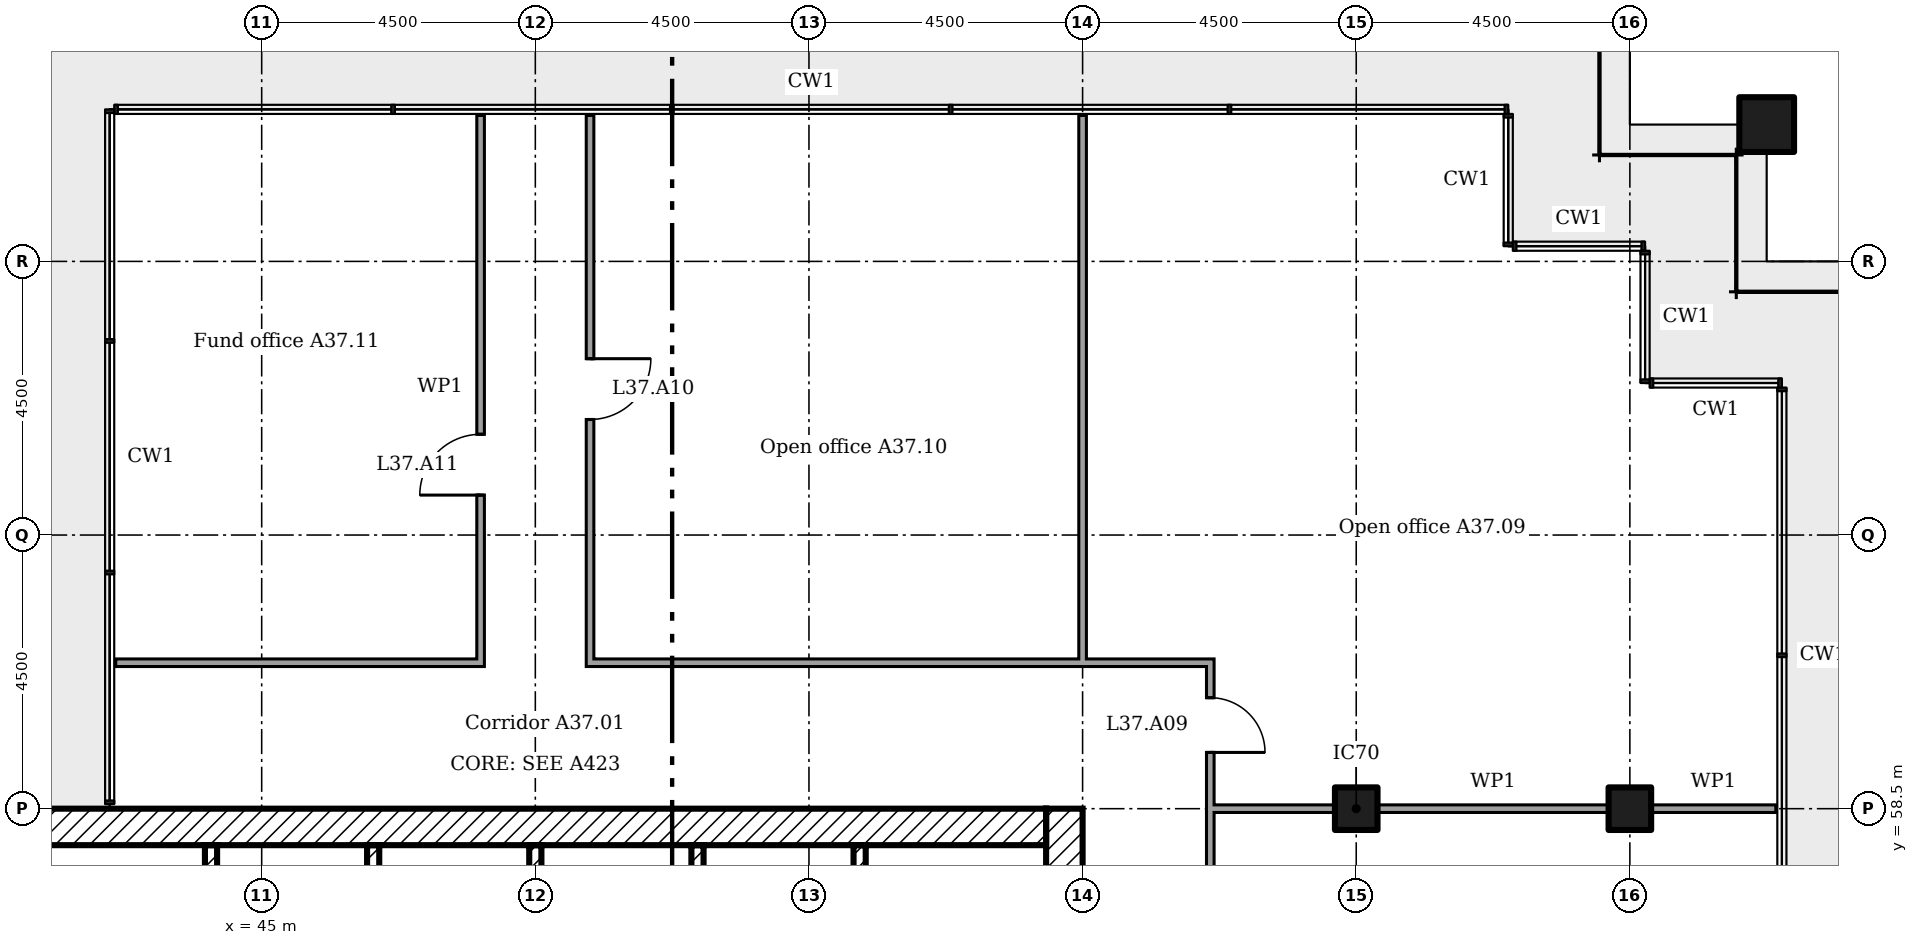
"""IFC4 building model, lengths in metres.
Left out: names, types, materials, properties, quantities, classifications, styles, units other than length and angle.
Written with IfcOpenShell. Run it as: python <this file> out.ifc"""

import sys

from ifc_helpers import new_model, si_unit, direction, frame, frame_2d, origin, origin_2d, place, context, subcontext, project, spatial, rectangle, extrude, element, fill, save


model = new_model("IFC4")
c1 = context("Model", 3, precision=1e-05, world=origin(), true_north=direction((0.0, 1.0)))
c2 = subcontext(c1, "Body", "Model", "MODEL_VIEW")
j1 = project(units=[si_unit("LENGTHUNIT", "METRE"), si_unit("PLANEANGLEUNIT", "RADIAN")], contexts=[c1])
p1 = place(None, origin())
s1 = spatial("IfcSite", under=j1, at=p1, CompositionType="ELEMENT")
p2 = place(p1, origin())
s2 = spatial("IfcBuilding", under=s1, at=p2, CompositionType="ELEMENT")
p3 = place(p2, frame((0.0, 0.0, 151.0)))
s3 = spatial("IfcBuildingStorey", under=s2, at=p3, CompositionType="ELEMENT", Elevation=151.0)
p4 = place(p3, frame((69.75, 69.75, 0.0)))
e1 = element("IfcColumn", 1, at=p4, inside=s3, PredefinedType="COLUMN", context=c2, shape_type="SweptSolid", body=[
    extrude(rectangle(XDim=0.9, YDim=0.9, at=origin_2d()), origin(), (0.0, 0.0, 1.0), 3.6),
])
for number, where in (
    (2, (63.0, 58.5, 0.0)),
    (3, (67.5, 58.5, 0.0)),
):
    element("IfcColumn", number, at=place(p3, frame(where)), inside=s3, PredefinedType="COLUMN", context=c2, shape_type="SweptSolid", body=[
        extrude(rectangle(XDim=0.7, YDim=0.7, at=origin_2d()), origin(), (0.0, 0.0, 1.0), 3.6),
    ])
p5 = place(p3, frame((58.2, 40.5, 0.0), z_axis=(0.0, 0.0, 1.0), x_axis=(0.0, 1.0, 0.0)))
e4 = element("IfcWall", 4, at=p5, inside=s3, PredefinedType="SHEAR", context=c2, shape_type="SweptSolid", body=[
    extrude(rectangle(XDim=18.0, YDim=0.6, at=frame_2d((9.0, 0.0))), origin(), (0.0, 0.0, 1.0), 3.35),
])
p6 = place(p5, frame((13.15, 0.0, 0.0)))
e5 = element("IfcOpeningElement", 5, at=p6, cuts=e4, PredefinedType="OPENING", context=c2, shape_type="SweptSolid", body=[
    extrude(rectangle(XDim=1.2, YDim=2.1, at=frame_2d((0.6, 1.05))), frame((0.0, 0.31, 0.0), z_axis=(0.0, -1.0, 0.0), x_axis=(1.0, 0.0, 0.0)), (0.0, 0.0, 1.0), 0.62),
])
p7 = place(p5, frame((3.9, 0.0, 0.0)))
e6 = element("IfcOpeningElement", 6, at=p7, cuts=e4, PredefinedType="OPENING", context=c2, shape_type="SweptSolid", body=[
    extrude(rectangle(XDim=1.8, YDim=2.1, at=frame_2d((0.9, 1.05))), frame((0.0, 0.31, 0.0), z_axis=(0.0, -1.0, 0.0), x_axis=(1.0, 0.0, 0.0)), (0.0, 0.0, 1.0), 0.62),
])
p8 = place(p5, frame((11.525, 0.0, 0.0)))
e7 = element("IfcOpeningElement", 7, at=p8, cuts=e4, PredefinedType="OPENING", context=c2, shape_type="SweptSolid", body=[
    extrude(rectangle(XDim=1.0, YDim=2.1, at=frame_2d((0.5, 1.05))), frame((0.0, 0.31, 0.0), z_axis=(0.0, -1.0, 0.0), x_axis=(1.0, 0.0, 0.0)), (0.0, 0.0, 1.0), 0.62),
])
p9 = place(p3, frame((40.5, 58.2, 0.0)))
e8 = element("IfcWall", 8, at=p9, inside=s3, PredefinedType="SHEAR", context=c2, shape_type="SweptSolid", body=[
    extrude(rectangle(XDim=17.4, YDim=0.6, at=frame_2d((8.7, 0.0))), origin(), (0.0, 0.0, 1.0), 3.35),
])
p10 = place(p3, frame((44.167, 57.9, 0.0), z_axis=(0.0, 0.0, 1.0), x_axis=(0.0, -1.0, 0.0)))
e9 = element("IfcWall", 9, at=p10, inside=s3, PredefinedType="SHEAR", context=c2, shape_type="SweptSolid", body=[
    extrude(rectangle(XDim=3.5, YDim=0.2, at=frame_2d((1.75, 0.0))), origin(), (0.0, 0.0, 1.0), 3.35),
])
p11 = place(p3, frame((46.833, 57.9, 0.0), z_axis=(0.0, 0.0, 1.0), x_axis=(0.0, -1.0, 0.0)))
e10 = element("IfcWall", 10, at=p11, inside=s3, PredefinedType="SHEAR", context=c2, shape_type="SweptSolid", body=[
    extrude(rectangle(XDim=4.6, YDim=0.2, at=frame_2d((2.3, 0.0))), origin(), (0.0, 0.0, 1.0), 3.35),
])
for number, where, z_axis, x_axis in (
    (11, (49.5, 57.9, 0.0), (0.0, 0.0, 1.0), (0.0, -1.0, 0.0)),
    (12, (52.167, 57.9, 0.0), (0.0, 0.0, 1.0), (0.0, -1.0, 0.0)),
    (13, (54.833, 57.9, 0.0), (0.0, 0.0, 1.0), (0.0, -1.0, 0.0)),
):
    element("IfcWall", number, at=place(p3, frame(where, z_axis=z_axis, x_axis=x_axis)), inside=s3, PredefinedType="SHEAR", context=c2, shape_type="SweptSolid", body=[
        extrude(rectangle(XDim=2.7, YDim=0.2, at=frame_2d((1.35, 0.0))), origin(), (0.0, 0.0, 1.0), 3.35),
    ])
p12 = place(p3, frame((60.6, 58.5, 0.0)))
e14 = element("IfcWall", 14, at=p12, inside=s3, PredefinedType="PARTITIONING", context=c2, shape_type="SweptSolid", body=[
    extrude(rectangle(XDim=2.05, YDim=0.125, at=frame_2d((1.025, 0.0))), origin(), (0.0, 0.0, 1.0), 2.676),
])
p13 = place(p3, frame((63.35, 58.5, 0.0)))
e15 = element("IfcWall", 15, at=p13, inside=s3, PredefinedType="PARTITIONING", context=c2, shape_type="SweptSolid", body=[
    extrude(rectangle(XDim=3.8, YDim=0.125, at=frame_2d((1.9, 0.0))), origin(), (0.0, 0.0, 1.0), 2.676),
])
p14 = place(p3, frame((67.85, 58.5, 0.0)))
e16 = element("IfcWall", 16, at=p14, inside=s3, PredefinedType="PARTITIONING", context=c2, shape_type="SweptSolid", body=[
    extrude(rectangle(XDim=2.05, YDim=0.125, at=frame_2d((1.025, 0.0))), origin(), (0.0, 0.0, 1.0), 2.676),
])
p15 = place(p3, frame((42.6, 60.9, 0.0)))
e17 = element("IfcWall", 17, at=p15, inside=s3, PredefinedType="PARTITIONING", context=c2, shape_type="SweptSolid", body=[
    extrude(rectangle(XDim=6.062, YDim=0.125, at=frame_2d((3.031, 0.0))), origin(), (0.0, 0.0, 1.0), 3.45),
])
p16 = place(p3, frame((50.337, 60.9, 0.0)))
e18 = element("IfcWall", 18, at=p16, inside=s3, PredefinedType="PARTITIONING", context=c2, shape_type="SweptSolid", body=[
    extrude(rectangle(XDim=10.325, YDim=0.125, at=frame_2d((5.163, 0.0))), origin(), (0.0, 0.0, 1.0), 3.45),
])
p17 = place(p3, frame((48.6, 60.962, 0.0), z_axis=(0.0, 0.0, 1.0), x_axis=(0.0, 1.0, 0.0)))
e19 = element("IfcWall", 19, at=p17, inside=s3, PredefinedType="PARTITIONING", context=c2, shape_type="SweptSolid", body=[
    extrude(rectangle(XDim=8.938, YDim=0.125, at=frame_2d((4.469, 0.0))), origin(), (0.0, 0.0, 1.0), 3.45),
])
p18 = place(p17, frame((2.695, 0.0, 0.0)))
e20 = element("IfcOpeningElement", 20, at=p18, cuts=e19, PredefinedType="OPENING", context=c2, shape_type="SweptSolid", body=[
    extrude(rectangle(XDim=1.0, YDim=2.1, at=frame_2d((0.5, 1.05))), frame((0.0, 0.073, 0.0), z_axis=(0.0, -1.0, 0.0), x_axis=(1.0, 0.0, 0.0)), (0.0, 0.0, 1.0), 0.145),
])
p19 = place(p3, frame((50.4, 60.962, 0.0), z_axis=(0.0, 0.0, 1.0), x_axis=(0.0, 1.0, 0.0)))
e21 = element("IfcWall", 21, at=p19, inside=s3, PredefinedType="PARTITIONING", context=c2, shape_type="SweptSolid", body=[
    extrude(rectangle(XDim=8.938, YDim=0.125, at=frame_2d((4.469, 0.0))), origin(), (0.0, 0.0, 1.0), 3.45),
])
p20 = place(p19, frame((3.938, 0.0, 0.0)))
e22 = element("IfcOpeningElement", 22, at=p20, cuts=e21, PredefinedType="OPENING", context=c2, shape_type="SweptSolid", body=[
    extrude(rectangle(XDim=1.0, YDim=2.1, at=frame_2d((0.5, 1.05))), frame((0.0, 0.073, 0.0), z_axis=(0.0, -1.0, 0.0), x_axis=(1.0, 0.0, 0.0)), (0.0, 0.0, 1.0), 0.145),
])
p21 = place(p3, frame((58.5, 60.9, 0.0), z_axis=(0.0, 0.0, 1.0), x_axis=(0.0, 1.0, 0.0)))
e23 = element("IfcWall", 23, at=p21, inside=s3, PredefinedType="PARTITIONING", context=c2, shape_type="SweptSolid", body=[
    extrude(rectangle(XDim=9.0, YDim=0.125, at=frame_2d((4.5, 0.0))), origin(), (0.0, 0.0, 1.0), 2.766),
])
p22 = place(p3, frame((60.6, 38.762, 0.0), z_axis=(0.0, 0.0, 1.0), x_axis=(0.0, 1.0, 0.0)))
e24 = element("IfcWall", 24, at=p22, inside=s3, PredefinedType="PARTITIONING", context=c2, shape_type="SweptSolid", body=[
    extrude(rectangle(XDim=22.075, YDim=0.125, at=frame_2d((11.038, 0.0))), origin(), (0.0, 0.0, 1.0), 3.45),
])
p23 = place(p22, frame((3.032, 0.0, 0.0)))
e25 = element("IfcOpeningElement", 25, at=p23, cuts=e24, PredefinedType="OPENING", context=c2, shape_type="SweptSolid", body=[
    extrude(rectangle(XDim=1.0, YDim=2.1, at=frame_2d((0.5, 1.05))), frame((0.0, 0.073, 0.0), z_axis=(0.0, -1.0, 0.0), x_axis=(1.0, 0.0, 0.0)), (0.0, 0.0, 1.0), 0.145),
])
p24 = place(p22, frame((8.442, 0.0, 0.0)))
e26 = element("IfcOpeningElement", 26, at=p24, cuts=e24, PredefinedType="OPENING", context=c2, shape_type="SweptSolid", body=[
    extrude(rectangle(XDim=1.0, YDim=2.1, at=frame_2d((0.5, 1.05))), frame((0.0, 0.073, 0.0), z_axis=(0.0, -1.0, 0.0), x_axis=(1.0, 0.0, 0.0)), (0.0, 0.0, 1.0), 0.145),
])
p25 = place(p22, frame((12.488, 0.0, 0.0)))
e27 = element("IfcOpeningElement", 27, at=p25, cuts=e24, PredefinedType="OPENING", context=c2, shape_type="SweptSolid", body=[
    extrude(rectangle(XDim=1.0, YDim=2.1, at=frame_2d((0.5, 1.05))), frame((0.0, 0.073, 0.0), z_axis=(0.0, -1.0, 0.0), x_axis=(1.0, 0.0, 0.0)), (0.0, 0.0, 1.0), 0.145),
])
p26 = place(p22, frame((16.532, 0.0, 0.0)))
e28 = element("IfcOpeningElement", 28, at=p26, cuts=e24, PredefinedType="OPENING", context=c2, shape_type="SweptSolid", body=[
    extrude(rectangle(XDim=1.0, YDim=2.1, at=frame_2d((0.5, 1.05))), frame((0.0, 0.073, 0.0), z_axis=(0.0, -1.0, 0.0), x_axis=(1.0, 0.0, 0.0)), (0.0, 0.0, 1.0), 0.145),
])
p27 = place(p22, frame((20.663, 0.0, 0.0)))
e29 = element("IfcOpeningElement", 29, at=p27, cuts=e24, PredefinedType="OPENING", context=c2, shape_type="SweptSolid", body=[
    extrude(rectangle(XDim=0.9, YDim=2.1, at=frame_2d((0.45, 1.05))), frame((0.0, 0.073, 0.0), z_axis=(0.0, -1.0, 0.0), x_axis=(1.0, 0.0, 0.0)), (0.0, 0.0, 1.0), 0.145),
])
p28 = place(p27, frame((0.9, 0.0, 0.0), x_axis=(-1.0, 0.0, 0.0)))
e30 = element("IfcDoor", 30, at=p28, inside=s3, OperationType="SINGLE_SWING_LEFT", PredefinedType="DOOR", context=c2, shape_type="SweptSolid", body=[
    extrude(rectangle(XDim=0.9, YDim=2.1, at=frame_2d((0.45, 1.05))), frame((0.0, 0.025, 0.0), z_axis=(0.0, -1.0, 0.0), x_axis=(1.0, 0.0, 0.0)), (0.0, 0.0, 1.0), 0.05),
])
fill(e29, e30)
p29 = place(p20, frame((1.0, 0.0, 0.0), x_axis=(-1.0, 0.0, 0.0)))
e31 = element("IfcDoor", 31, at=p29, inside=s3, OperationType="SINGLE_SWING_RIGHT", PredefinedType="DOOR", context=c2, shape_type="SweptSolid", body=[
    extrude(rectangle(XDim=1.0, YDim=2.1, at=frame_2d((0.5, 1.05))), frame((0.0, 0.025, 0.0), z_axis=(0.0, -1.0, 0.0), x_axis=(1.0, 0.0, 0.0)), (0.0, 0.0, 1.0), 0.05),
])
fill(e22, e31)
p30 = place(p18, origin())
e32 = element("IfcDoor", 32, at=p30, inside=s3, OperationType="SINGLE_SWING_RIGHT", PredefinedType="DOOR", context=c2, shape_type="SweptSolid", body=[
    extrude(rectangle(XDim=1.0, YDim=2.1, at=frame_2d((0.5, 1.05))), frame((0.0, 0.025, 0.0), z_axis=(0.0, -1.0, 0.0), x_axis=(1.0, 0.0, 0.0)), (0.0, 0.0, 1.0), 0.05),
])
fill(e20, e32)
save(model, sys.argv[1])
